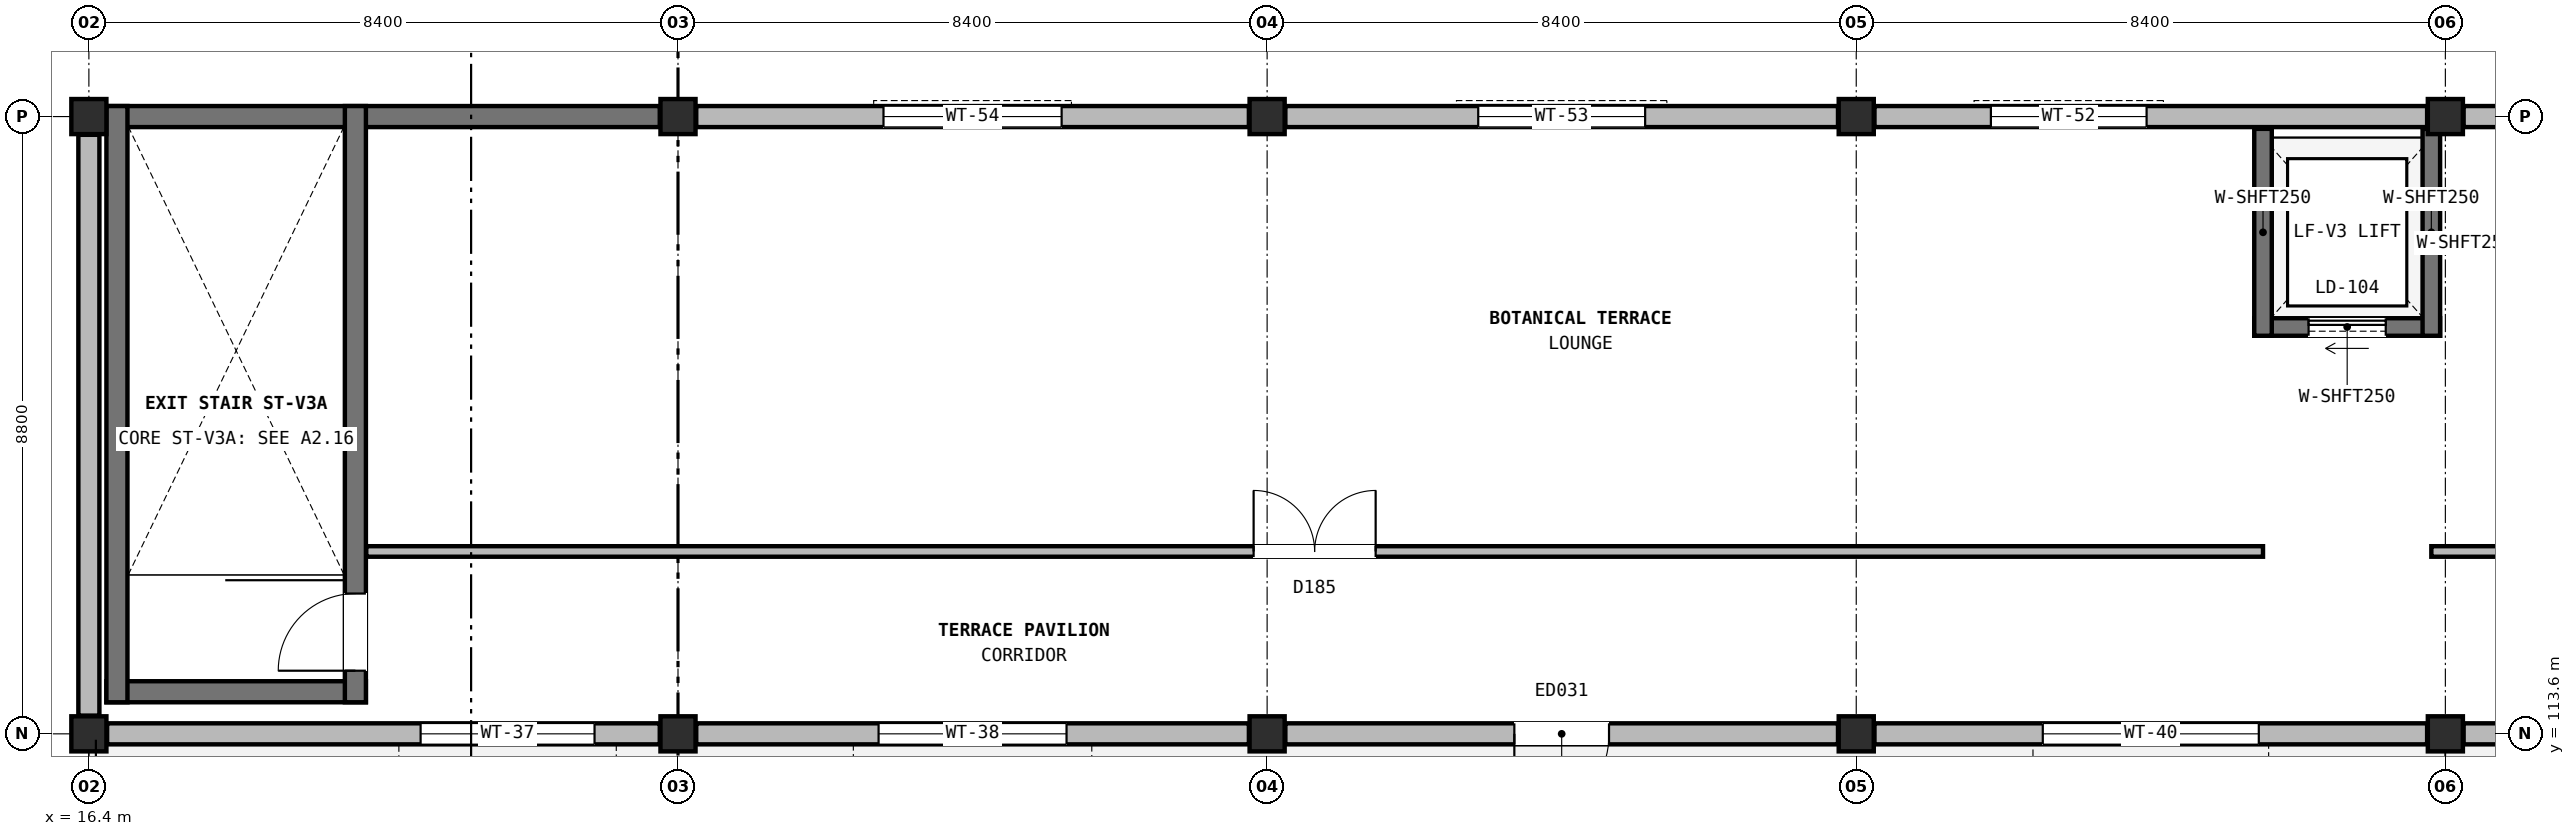
"""IFC4 building model, lengths in metres.
Left out: names, types, materials, properties, quantities, classifications, styles, units other than length and angle.
Written with IfcOpenShell. Run it as: python <this file> out.ifc"""

import sys

from ifc_helpers import new_model, si_unit, direction, frame, frame_2d, origin, origin_2d, place, context, subcontext, project, spatial, rectangle, extrude, element, fill, save


model = new_model("IFC4")
c1 = context("Model", 3, precision=1e-05, world=origin(), true_north=direction((0.0, 1.0)))
c2 = subcontext(c1, "Body", "Model", "MODEL_VIEW")
j1 = project(units=[si_unit("LENGTHUNIT", "METRE"), si_unit("PLANEANGLEUNIT", "RADIAN")], contexts=[c1])
p1 = place(None, origin())
s1 = spatial("IfcSite", under=j1, at=p1, CompositionType="ELEMENT")
p2 = place(p1, origin())
s2 = spatial("IfcBuilding", under=s1, at=p2, CompositionType="ELEMENT")
p3 = place(p2, frame((0.0, 0.0, 13.2)))
s3 = spatial("IfcBuildingStorey", under=s2, at=p3, CompositionType="ELEMENT", Elevation=13.2)
for number, where, z_axis, x_axis in (
    (1, (16.4, 113.6, 0.0), (0.0, 0.0, 1.0), (1.0, 0.0, 0.0)),
    (2, (16.4, 122.4, 0.0), (0.0, 0.0, 1.0), (1.0, 0.0, 0.0)),
    (3, (24.8, 113.6, 0.0), (0.0, 0.0, 1.0), (1.0, 0.0, 0.0)),
    (4, (24.8, 122.4, 0.0), (0.0, 0.0, 1.0), (1.0, 0.0, 0.0)),
    (5, (33.2, 113.6, 0.0), (0.0, 0.0, 1.0), (1.0, 0.0, 0.0)),
    (6, (33.2, 122.4, 0.0), (0.0, 0.0, 1.0), (1.0, 0.0, 0.0)),
    (7, (41.6, 113.6, 0.0), (0.0, 0.0, 1.0), (1.0, 0.0, 0.0)),
    (8, (41.6, 122.4, 0.0), (0.0, 0.0, 1.0), (1.0, 0.0, 0.0)),
    (9, (50.0, 113.6, 0.0), (0.0, 0.0, 1.0), (1.0, 0.0, 0.0)),
    (10, (50.0, 122.4, 0.0), (0.0, 0.0, 1.0), (1.0, 0.0, 0.0)),
):
    element("IfcColumn", number, at=place(p3, frame(where, z_axis=z_axis, x_axis=x_axis)), inside=s3, PredefinedType="COLUMN", context=c2, shape_type="SweptSolid", body=[
        extrude(rectangle(XDim=0.5, YDim=0.5, at=origin_2d()), origin(), (0.0, 0.0, 1.0), 4.0),
    ])
p4 = place(p3, frame((16.66, 113.6, 0.0), z_axis=(0.0, 0.0, 1.0), x_axis=(1.0, 0.0, 0.0)))
e11 = element("IfcWall", 11, at=p4, inside=s3, PredefinedType="SOLIDWALL", context=c2, shape_type="SweptSolid", body=[
    extrude(rectangle(XDim=7.88, YDim=0.3, at=frame_2d((3.94, 0.0))), origin(), (0.0, 0.0, 1.0), 3.35),
])
p5 = place(p4, frame((4.47, 0.0, 0.9)))
e12 = element("IfcOpeningElement", 12, at=p5, cuts=e11, PredefinedType="OPENING", context=c2, shape_type="SweptSolid", body=[
    extrude(rectangle(XDim=2.48, YDim=2.08, at=frame_2d((1.24, 1.04))), frame((0.0, 0.16, 0.0), z_axis=(0.0, -1.0, 0.0), x_axis=(1.0, 0.0, 0.0)), (0.0, 0.0, 1.0), 0.32),
])
p6 = place(p3, frame((25.06, 113.6, 0.0), z_axis=(0.0, 0.0, 1.0), x_axis=(1.0, 0.0, 0.0)))
e13 = element("IfcWall", 13, at=p6, inside=s3, PredefinedType="SOLIDWALL", context=c2, shape_type="SweptSolid", body=[
    extrude(rectangle(XDim=7.88, YDim=0.3, at=frame_2d((3.94, 0.0))), origin(), (0.0, 0.0, 1.0), 3.35),
])
p7 = place(p6, frame((2.6, 0.0, 0.9)))
e14 = element("IfcOpeningElement", 14, at=p7, cuts=e13, PredefinedType="OPENING", context=c2, shape_type="SweptSolid", body=[
    extrude(rectangle(XDim=2.68, YDim=2.12, at=frame_2d((1.34, 1.06))), frame((0.0, 0.16, 0.0), z_axis=(0.0, -1.0, 0.0), x_axis=(1.0, 0.0, 0.0)), (0.0, 0.0, 1.0), 0.32),
])
p8 = place(p3, frame((33.46, 113.6, 0.0), z_axis=(0.0, 0.0, 1.0), x_axis=(1.0, 0.0, 0.0)))
e15 = element("IfcWall", 15, at=p8, inside=s3, PredefinedType="SOLIDWALL", context=c2, shape_type="SweptSolid", body=[
    extrude(rectangle(XDim=7.88, YDim=0.3, at=frame_2d((3.94, 0.0))), origin(), (0.0, 0.0, 1.0), 3.35),
])
p9 = place(p8, frame((3.265, 0.0, 0.0)))
e16 = element("IfcOpeningElement", 16, at=p9, cuts=e15, PredefinedType="OPENING", context=c2, shape_type="SweptSolid", body=[
    extrude(rectangle(XDim=1.35, YDim=2.25, at=frame_2d((0.675, 1.125))), frame((0.0, 0.16, 0.0), z_axis=(0.0, -1.0, 0.0), x_axis=(1.0, 0.0, 0.0)), (0.0, 0.0, 1.0), 0.32),
])
p10 = place(p3, frame((41.86, 113.6, 0.0), z_axis=(0.0, 0.0, 1.0), x_axis=(1.0, 0.0, 0.0)))
e17 = element("IfcWall", 17, at=p10, inside=s3, PredefinedType="SOLIDWALL", context=c2, shape_type="SweptSolid", body=[
    extrude(rectangle(XDim=7.88, YDim=0.3, at=frame_2d((3.94, 0.0))), origin(), (0.0, 0.0, 1.0), 3.35),
])
p11 = place(p10, frame((2.4, 0.0, 0.9)))
e18 = element("IfcOpeningElement", 18, at=p11, cuts=e17, PredefinedType="OPENING", context=c2, shape_type="SweptSolid", body=[
    extrude(rectangle(XDim=3.08, YDim=2.18, at=frame_2d((1.54, 1.09))), frame((0.0, 0.16, 0.0), z_axis=(0.0, -1.0, 0.0), x_axis=(1.0, 0.0, 0.0)), (0.0, 0.0, 1.0), 0.32),
])
p12 = place(p3, frame((50.26, 113.6, 0.0), z_axis=(0.0, 0.0, 1.0), x_axis=(1.0, 0.0, 0.0)))
e19 = element("IfcWall", 19, at=p12, inside=s3, PredefinedType="SOLIDWALL", context=c2, shape_type="SweptSolid", body=[
    extrude(rectangle(XDim=7.88, YDim=0.3, at=frame_2d((3.94, 0.0))), origin(), (0.0, 0.0, 1.0), 3.35),
])
p13 = place(p12, frame((3.25, 0.0, 0.9)))
e20 = element("IfcOpeningElement", 20, at=p13, cuts=e19, PredefinedType="OPENING", context=c2, shape_type="SweptSolid", body=[
    extrude(rectangle(XDim=1.38, YDim=2.24, at=frame_2d((0.69, 1.12))), frame((0.0, 0.16, 0.0), z_axis=(0.0, -1.0, 0.0), x_axis=(1.0, 0.0, 0.0)), (0.0, 0.0, 1.0), 0.32),
])
p14 = place(p3, frame((58.14, 122.4, 0.0), z_axis=(0.0, 0.0, 1.0), x_axis=(-1.0, 0.0, 0.0)))
e21 = element("IfcWall", 21, at=p14, inside=s3, PredefinedType="SOLIDWALL", context=c2, shape_type="SweptSolid", body=[
    extrude(rectangle(XDim=7.88, YDim=0.3, at=frame_2d((3.94, 0.0))), origin(), (0.0, 0.0, 1.0), 3.35),
])
p15 = place(p14, frame((2.9, 0.0, 0.9)))
e22 = element("IfcOpeningElement", 22, at=p15, cuts=e21, PredefinedType="OPENING", context=c2, shape_type="SweptSolid", body=[
    extrude(rectangle(XDim=2.08, YDim=2.04, at=frame_2d((1.04, 1.02))), frame((0.0, 0.16, 0.0), z_axis=(0.0, -1.0, 0.0), x_axis=(1.0, 0.0, 0.0)), (0.0, 0.0, 1.0), 0.32),
])
p16 = place(p3, frame((49.74, 122.4, 0.0), z_axis=(0.0, 0.0, 1.0), x_axis=(-1.0, 0.0, 0.0)))
e23 = element("IfcWall", 23, at=p16, inside=s3, PredefinedType="SOLIDWALL", context=c2, shape_type="SweptSolid", body=[
    extrude(rectangle(XDim=7.88, YDim=0.3, at=frame_2d((3.94, 0.0))), origin(), (0.0, 0.0, 1.0), 3.35),
])
p17 = place(p16, frame((4.0, 0.0, 0.9)))
e24 = element("IfcOpeningElement", 24, at=p17, cuts=e23, PredefinedType="OPENING", context=c2, shape_type="SweptSolid", body=[
    extrude(rectangle(XDim=2.22, YDim=2.08, at=frame_2d((1.11, 1.04))), frame((0.0, 0.16, 0.0), z_axis=(0.0, -1.0, 0.0), x_axis=(1.0, 0.0, 0.0)), (0.0, 0.0, 1.0), 0.32),
])
p18 = place(p3, frame((41.34, 122.4, 0.0), z_axis=(0.0, 0.0, 1.0), x_axis=(-1.0, 0.0, 0.0)))
e25 = element("IfcWall", 25, at=p18, inside=s3, PredefinedType="SOLIDWALL", context=c2, shape_type="SweptSolid", body=[
    extrude(rectangle(XDim=7.88, YDim=0.3, at=frame_2d((3.94, 0.0))), origin(), (0.0, 0.0, 1.0), 3.35),
])
p19 = place(p18, frame((2.75, 0.0, 0.9)))
e26 = element("IfcOpeningElement", 26, at=p19, cuts=e25, PredefinedType="OPENING", context=c2, shape_type="SweptSolid", body=[
    extrude(rectangle(XDim=2.38, YDim=2.12, at=frame_2d((1.19, 1.06))), frame((0.0, 0.16, 0.0), z_axis=(0.0, -1.0, 0.0), x_axis=(1.0, 0.0, 0.0)), (0.0, 0.0, 1.0), 0.32),
])
p20 = place(p3, frame((32.94, 122.4, 0.0), z_axis=(0.0, 0.0, 1.0), x_axis=(-1.0, 0.0, 0.0)))
e27 = element("IfcWall", 27, at=p20, inside=s3, PredefinedType="SOLIDWALL", context=c2, shape_type="SweptSolid", body=[
    extrude(rectangle(XDim=7.88, YDim=0.3, at=frame_2d((3.94, 0.0))), origin(), (0.0, 0.0, 1.0), 3.35),
])
p21 = place(p20, frame((2.67, 0.0, 0.9)))
e28 = element("IfcOpeningElement", 28, at=p21, cuts=e27, PredefinedType="OPENING", context=c2, shape_type="SweptSolid", body=[
    extrude(rectangle(XDim=2.54, YDim=2.16, at=frame_2d((1.27, 1.08))), frame((0.0, 0.16, 0.0), z_axis=(0.0, -1.0, 0.0), x_axis=(1.0, 0.0, 0.0)), (0.0, 0.0, 1.0), 0.32),
])
p22 = place(p3, frame((24.54, 122.4, 0.0), z_axis=(0.0, 0.0, 1.0), x_axis=(-1.0, 0.0, 0.0)))
e29 = element("IfcWall", 29, at=p22, inside=s3, PredefinedType="SHEAR", context=c2, shape_type="SweptSolid", body=[
    extrude(rectangle(XDim=7.88, YDim=0.3, at=frame_2d((3.94, 0.0))), origin(), (0.0, 0.0, 1.0), 3.35),
])
p23 = place(p3, frame((16.4, 122.14, 0.0), z_axis=(0.0, 0.0, 1.0), x_axis=(0.0, -1.0, 0.0)))
e30 = element("IfcWall", 30, at=p23, inside=s3, PredefinedType="SOLIDWALL", context=c2, shape_type="SweptSolid", body=[
    extrude(rectangle(XDim=8.28, YDim=0.3, at=frame_2d((4.14, 0.0))), origin(), (0.0, 0.0, 1.0), 3.35),
])
p24 = place(p3, frame((16.65, 114.2, 0.0), z_axis=(0.0, 0.0, 1.0), x_axis=(1.0, 0.0, 0.0)))
e31 = element("IfcWall", 31, at=p24, inside=s3, PredefinedType="SHEAR", context=c2, shape_type="SweptSolid", body=[
    extrude(rectangle(XDim=3.7, YDim=0.3, at=frame_2d((1.85, 0.0))), origin(), (0.0, 0.0, 1.0), 4.0),
])
p25 = place(p3, frame((16.8, 114.05, 0.0), z_axis=(0.0, 0.0, 1.0), x_axis=(0.0, 1.0, 0.0)))
e32 = element("IfcWall", 32, at=p25, inside=s3, PredefinedType="SHEAR", context=c2, shape_type="SweptSolid", body=[
    extrude(rectangle(XDim=8.5, YDim=0.3, at=frame_2d((4.25, 0.0))), origin(), (0.0, 0.0, 1.0), 4.0),
])
p26 = place(p3, frame((20.2, 114.05, 0.0), z_axis=(0.0, 0.0, 1.0), x_axis=(0.0, 1.0, 0.0)))
e33 = element("IfcWall", 33, at=p26, inside=s3, PredefinedType="SHEAR", context=c2, shape_type="SweptSolid", body=[
    extrude(rectangle(XDim=8.5, YDim=0.3, at=frame_2d((4.25, 0.0))), origin(), (0.0, 0.0, 1.0), 4.0),
])
p27 = place(p26, frame((0.45, 0.0, 0.0)))
e34 = element("IfcOpeningElement", 34, at=p27, cuts=e33, PredefinedType="OPENING", context=c2, shape_type="SweptSolid", body=[
    extrude(rectangle(XDim=1.1, YDim=2.2, at=frame_2d((0.55, 1.1))), frame((0.0, 0.16, 0.0), z_axis=(0.0, -1.0, 0.0), x_axis=(1.0, 0.0, 0.0)), (0.0, 0.0, 1.0), 0.32),
])
p28 = place(p3, frame((47.275, 119.4, 0.0), z_axis=(0.0, 0.0, 1.0), x_axis=(1.0, 0.0, 0.0)))
e35 = element("IfcWall", 35, at=p28, inside=s3, PredefinedType="SOLIDWALL", context=c2, shape_type="SweptSolid", body=[
    extrude(rectangle(XDim=2.65, YDim=0.25, at=frame_2d((1.325, 0.0))), origin(), (0.0, 0.0, 1.0), 3.68),
])
p29 = place(p28, frame((0.775, 0.0, 0.0)))
e36 = element("IfcOpeningElement", 36, at=p29, cuts=e35, PredefinedType="OPENING", context=c2, shape_type="SweptSolid", body=[
    extrude(rectangle(XDim=1.1, YDim=2.2, at=frame_2d((0.55, 1.1))), frame((0.0, 0.135, 0.0), z_axis=(0.0, -1.0, 0.0), x_axis=(1.0, 0.0, 0.0)), (0.0, 0.0, 1.0), 0.27),
])
for number, where, z_axis, x_axis in (
    (37, (47.4, 119.275, 0.0), (0.0, 0.0, 1.0), (0.0, 1.0, 0.0)),
    (38, (49.8, 119.275, 0.0), (0.0, 0.0, 1.0), (0.0, 1.0, 0.0)),
):
    element("IfcWall", number, at=place(p3, frame(where, z_axis=z_axis, x_axis=x_axis)), inside=s3, PredefinedType="SOLIDWALL", context=c2, shape_type="SweptSolid", body=[
        extrude(rectangle(XDim=2.95, YDim=0.25, at=frame_2d((1.475, 0.0))), origin(), (0.0, 0.0, 1.0), 3.68),
    ])
p30 = place(p3, frame((20.355, 116.2, 0.0), z_axis=(0.0, 0.0, 1.0), x_axis=(1.0, 0.0, 0.0)))
e39 = element("IfcWall", 39, at=p30, inside=s3, PredefinedType="PARTITIONING", context=c2, shape_type="SweptSolid", body=[
    extrude(rectangle(XDim=27.045, YDim=0.15, at=frame_2d((13.522, 0.0))), origin(), (0.0, 0.0, 1.0), 3.665),
])
p31 = place(p30, frame((12.653, 0.0, 0.0)))
e40 = element("IfcOpeningElement", 40, at=p31, cuts=e39, PredefinedType="OPENING", context=c2, shape_type="SweptSolid", body=[
    extrude(rectangle(XDim=1.74, YDim=2.34, at=frame_2d((0.87, 1.17))), frame((0.0, 0.085, 0.0), z_axis=(0.0, -1.0, 0.0), x_axis=(1.0, 0.0, 0.0)), (0.0, 0.0, 1.0), 0.17),
])
p32 = place(p3, frame((49.8, 116.2, 0.0), z_axis=(0.0, 0.0, 1.0), x_axis=(1.0, 0.0, 0.0)))
e41 = element("IfcWall", 41, at=p32, inside=s3, PredefinedType="PARTITIONING", context=c2, shape_type="SweptSolid", body=[
    extrude(rectangle(XDim=12.8, YDim=0.15, at=frame_2d((6.4, 0.0))), origin(), (0.0, 0.0, 1.0), 3.665),
])
p33 = place(p32, frame((5.93, 0.0, 0.0)))
e42 = element("IfcOpeningElement", 42, at=p33, cuts=e41, PredefinedType="OPENING", context=c2, shape_type="SweptSolid", body=[
    extrude(rectangle(XDim=0.94, YDim=2.12, at=frame_2d((0.47, 1.06))), frame((0.0, 0.085, 0.0), z_axis=(0.0, -1.0, 0.0), x_axis=(1.0, 0.0, 0.0)), (0.0, 0.0, 1.0), 0.17),
])
p34 = place(p5, origin())
e43 = element("IfcWindow", 43, at=p34, inside=s3, PartitioningType="SINGLE_PANEL", PredefinedType="WINDOW", context=c2, shape_type="SweptSolid", body=[
    extrude(rectangle(XDim=2.48, YDim=2.08, at=frame_2d((1.24, 1.04))), frame((0.0, 0.03, 0.0), z_axis=(0.0, -1.0, 0.0), x_axis=(1.0, 0.0, 0.0)), (0.0, 0.0, 1.0), 0.06),
])
fill(e12, e43)
p35 = place(p7, origin())
e44 = element("IfcWindow", 44, at=p35, inside=s3, PartitioningType="SINGLE_PANEL", PredefinedType="WINDOW", context=c2, shape_type="SweptSolid", body=[
    extrude(rectangle(XDim=2.68, YDim=2.12, at=frame_2d((1.34, 1.06))), frame((0.0, 0.03, 0.0), z_axis=(0.0, -1.0, 0.0), x_axis=(1.0, 0.0, 0.0)), (0.0, 0.0, 1.0), 0.06),
])
fill(e14, e44)
p36 = place(p9, frame((1.35, 0.0, 0.0), z_axis=(0.0, 0.0, 1.0), x_axis=(-1.0, 0.0, 0.0)))
e45 = element("IfcDoor", 45, at=p36, inside=s3, OperationType="SINGLE_SWING_LEFT", PredefinedType="DOOR", context=c2, shape_type="SweptSolid", body=[
    extrude(rectangle(XDim=1.35, YDim=2.25, at=frame_2d((0.675, 1.125))), frame((0.0, 0.025, 0.0), z_axis=(0.0, -1.0, 0.0), x_axis=(1.0, 0.0, 0.0)), (0.0, 0.0, 1.0), 0.05),
])
fill(e16, e45)
p37 = place(p11, origin())
e46 = element("IfcWindow", 46, at=p37, inside=s3, PartitioningType="SINGLE_PANEL", PredefinedType="WINDOW", context=c2, shape_type="SweptSolid", body=[
    extrude(rectangle(XDim=3.08, YDim=2.18, at=frame_2d((1.54, 1.09))), frame((0.0, 0.03, 0.0), z_axis=(0.0, -1.0, 0.0), x_axis=(1.0, 0.0, 0.0)), (0.0, 0.0, 1.0), 0.06),
])
fill(e18, e46)
p38 = place(p17, origin())
e47 = element("IfcWindow", 47, at=p38, inside=s3, PartitioningType="SINGLE_PANEL", PredefinedType="WINDOW", context=c2, shape_type="SweptSolid", body=[
    extrude(rectangle(XDim=2.22, YDim=2.08, at=frame_2d((1.11, 1.04))), frame((0.0, 0.03, 0.0), z_axis=(0.0, -1.0, 0.0), x_axis=(1.0, 0.0, 0.0)), (0.0, 0.0, 1.0), 0.06),
])
fill(e24, e47)
p39 = place(p19, origin())
e48 = element("IfcWindow", 48, at=p39, inside=s3, PartitioningType="SINGLE_PANEL", PredefinedType="WINDOW", context=c2, shape_type="SweptSolid", body=[
    extrude(rectangle(XDim=2.38, YDim=2.12, at=frame_2d((1.19, 1.06))), frame((0.0, 0.03, 0.0), z_axis=(0.0, -1.0, 0.0), x_axis=(1.0, 0.0, 0.0)), (0.0, 0.0, 1.0), 0.06),
])
fill(e26, e48)
p40 = place(p21, origin())
e49 = element("IfcWindow", 49, at=p40, inside=s3, PartitioningType="SINGLE_PANEL", PredefinedType="WINDOW", context=c2, shape_type="SweptSolid", body=[
    extrude(rectangle(XDim=2.54, YDim=2.16, at=frame_2d((1.27, 1.08))), frame((0.0, 0.03, 0.0), z_axis=(0.0, -1.0, 0.0), x_axis=(1.0, 0.0, 0.0)), (0.0, 0.0, 1.0), 0.06),
])
fill(e28, e49)
p41 = place(p27, origin())
e50 = element("IfcDoor", 50, at=p41, inside=s3, OperationType="SINGLE_SWING_LEFT", PredefinedType="DOOR", context=c2, shape_type="SweptSolid", body=[
    extrude(rectangle(XDim=1.1, YDim=2.2, at=frame_2d((0.55, 1.1))), frame((0.0, 0.025, 0.0), z_axis=(0.0, -1.0, 0.0), x_axis=(1.0, 0.0, 0.0)), (0.0, 0.0, 1.0), 0.05),
])
fill(e34, e50)
p42 = place(p29, origin())
e51 = element("IfcDoor", 51, at=p42, inside=s3, OperationType="SLIDING_TO_LEFT", PredefinedType="DOOR", context=c2, shape_type="SweptSolid", body=[
    extrude(rectangle(XDim=1.1, YDim=2.2, at=frame_2d((0.55, 1.1))), frame((0.0, 0.025, 0.0), z_axis=(0.0, -1.0, 0.0), x_axis=(1.0, 0.0, 0.0)), (0.0, 0.0, 1.0), 0.05),
])
fill(e36, e51)
p43 = place(p31, origin())
e52 = element("IfcDoor", 52, at=p43, inside=s3, OperationType="DOUBLE_DOOR_SINGLE_SWING", PredefinedType="DOOR", context=c2, shape_type="SweptSolid", body=[
    extrude(rectangle(XDim=1.74, YDim=2.34, at=frame_2d((0.87, 1.17))), frame((0.0, 0.025, 0.0), z_axis=(0.0, -1.0, 0.0), x_axis=(1.0, 0.0, 0.0)), (0.0, 0.0, 1.0), 0.05),
])
fill(e40, e52)
save(model, sys.argv[1])
